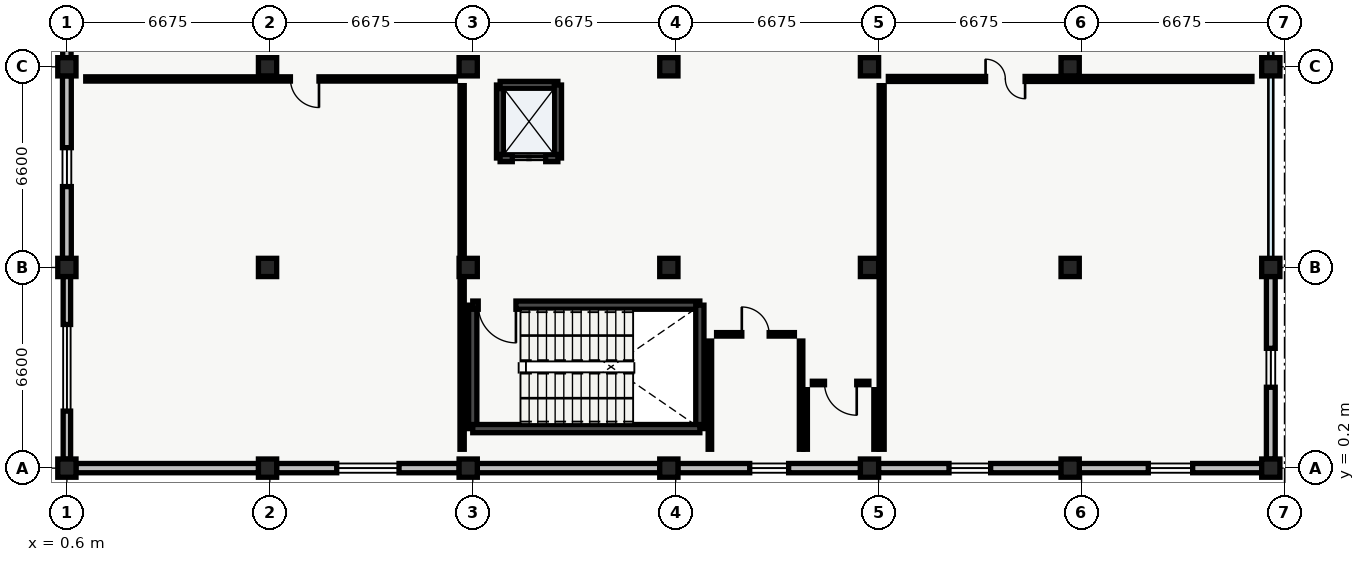
"""IFC4 building model, lengths in metres.
Left out: names, types, materials, properties, quantities, classifications, styles, units other than length and angle.
Written with IfcOpenShell. Run it as: python <this file> out.ifc"""

import sys

from ifc_helpers import new_model, si_unit, direction, frame, frame_2d, origin, origin_2d, place, context, subcontext, project, spatial, rectangle, extrude, element, fill, save


model = new_model("IFC4")
c1 = context("Model", 3, precision=1e-05, world=origin(), true_north=direction((0.0, 1.0)))
c2 = subcontext(c1, "Body", "Model", "MODEL_VIEW")
j1 = project(units=[si_unit("LENGTHUNIT", "METRE"), si_unit("PLANEANGLEUNIT", "RADIAN")], contexts=[c1])
p1 = place(None, origin())
s1 = spatial("IfcSite", under=j1, at=p1, CompositionType="ELEMENT")
p2 = place(p1, origin())
s2 = spatial("IfcBuilding", under=s1, at=p2, CompositionType="ELEMENT")
p3 = place(p2, frame((0.0, 0.0, 9.6)))
s3 = spatial("IfcBuildingStorey", under=s2, at=p3, CompositionType="ELEMENT", Elevation=9.6)
for number, where, z_axis, x_axis in (
    (1, (0.6, 0.2, 0.0), (0.0, 0.0, 1.0), (1.0, 0.0, 0.0)),
    (2, (0.6, 6.8, 0.0), (0.0, 0.0, 1.0), (1.0, 0.0, 0.0)),
    (3, (0.6, 13.4, 0.0), (0.0, 0.0, 1.0), (1.0, 0.0, 0.0)),
    (4, (7.2, 0.2, 0.0), (0.0, 0.0, 1.0), (1.0, 0.0, 0.0)),
    (5, (7.2, 6.8, 0.0), (0.0, 0.0, 1.0), (1.0, 0.0, 0.0)),
    (6, (7.2, 13.4, 0.0), (0.0, 0.0, 1.0), (1.0, 0.0, 0.0)),
    (7, (13.8, 0.2, 0.0), (0.0, 0.0, 1.0), (1.0, 0.0, 0.0)),
    (8, (13.8, 6.8, 0.0), (0.0, 0.0, 1.0), (1.0, 0.0, 0.0)),
    (9, (13.8, 13.4, 0.0), (0.0, 0.0, 1.0), (1.0, 0.0, 0.0)),
    (10, (20.4, 0.2, 0.0), (0.0, 0.0, 1.0), (1.0, 0.0, 0.0)),
    (11, (20.4, 6.8, 0.0), (0.0, 0.0, 1.0), (1.0, 0.0, 0.0)),
    (12, (20.4, 13.4, 0.0), (0.0, 0.0, 1.0), (1.0, 0.0, 0.0)),
    (13, (27.0, 0.2, 0.0), (0.0, 0.0, 1.0), (1.0, 0.0, 0.0)),
    (14, (27.0, 6.8, 0.0), (0.0, 0.0, 1.0), (1.0, 0.0, 0.0)),
    (15, (27.0, 13.4, 0.0), (0.0, 0.0, 1.0), (1.0, 0.0, 0.0)),
    (16, (33.6, 0.2, 0.0), (0.0, 0.0, 1.0), (1.0, 0.0, 0.0)),
    (17, (33.6, 6.8, 0.0), (0.0, 0.0, 1.0), (1.0, 0.0, 0.0)),
    (18, (33.6, 13.4, 0.0), (0.0, 0.0, 1.0), (1.0, 0.0, 0.0)),
    (19, (40.2, 0.2, 0.0), (0.0, 0.0, 1.0), (1.0, 0.0, 0.0)),
    (20, (40.2, 6.8, 0.0), (0.0, 0.0, 1.0), (1.0, 0.0, 0.0)),
    (21, (40.2, 13.4, 0.0), (0.0, 0.0, 1.0), (1.0, 0.0, 0.0)),
):
    element("IfcColumn", number, at=place(p3, frame(where, z_axis=z_axis, x_axis=x_axis)), inside=s3, PredefinedType="COLUMN", context=c2, shape_type="SweptSolid", body=[
        extrude(rectangle(XDim=0.6, YDim=0.6, at=origin_2d()), origin(), (0.0, 0.0, 1.0), 4.28),
    ])
p4 = place(p3, frame((0.6, 0.495, 0.0), z_axis=(0.0, 0.0, 1.0), x_axis=(0.0, 1.0, 0.0)))
e22 = element("IfcWall", 22, at=p4, inside=s3, PredefinedType="STANDARD", context=c2, shape_type="SweptSolid", body=[
    extrude(rectangle(XDim=6.01, YDim=0.245, at=frame_2d((3.005, 0.0))), origin(), (0.0, 0.0, 1.0), 3.815),
])
p5 = place(p4, frame((1.58, 0.0, 0.95)))
e23 = element("IfcOpeningElement", 23, at=p5, cuts=e22, PredefinedType="OPENING", context=c2, shape_type="SweptSolid", body=[
    extrude(rectangle(XDim=2.85, YDim=1.5, at=frame_2d((1.425, 0.75))), frame((0.0, 0.123, 0.0), z_axis=(0.0, -1.0, 0.0), x_axis=(1.0, 0.0, 0.0)), (0.0, 0.0, 1.0), 0.245),
])
p6 = place(p3, frame((0.6, 7.095, 0.0), z_axis=(0.0, 0.0, 1.0), x_axis=(0.0, 1.0, 0.0)))
e24 = element("IfcWall", 24, at=p6, inside=s3, PredefinedType="STANDARD", context=c2, shape_type="SweptSolid", body=[
    extrude(rectangle(XDim=6.01, YDim=0.29, at=frame_2d((3.005, 0.0))), origin(), (0.0, 0.0, 1.0), 3.815),
])
p7 = place(p6, frame((2.365, 0.0, 0.95)))
e25 = element("IfcOpeningElement", 25, at=p7, cuts=e24, PredefinedType="OPENING", context=c2, shape_type="SweptSolid", body=[
    extrude(rectangle(XDim=1.28, YDim=1.42, at=frame_2d((0.64, 0.71))), frame((0.0, 0.145, 0.0), z_axis=(0.0, -1.0, 0.0), x_axis=(1.0, 0.0, 0.0)), (0.0, 0.0, 1.0), 0.29),
])
p8 = place(p3, frame((0.6, 13.695, 0.0), z_axis=(0.0, 0.0, 1.0), x_axis=(0.0, 1.0, 0.0)))
e26 = element("IfcWall", 26, at=p8, inside=s3, PredefinedType="STANDARD", context=c2, shape_type="SweptSolid", body=[
    extrude(rectangle(XDim=6.01, YDim=0.275, at=frame_2d((3.005, 0.0))), origin(), (0.0, 0.0, 1.0), 3.815),
])
p9 = place(p8, frame((1.98, 0.0, 0.95)))
e27 = element("IfcOpeningElement", 27, at=p9, cuts=e26, PredefinedType="OPENING", context=c2, shape_type="SweptSolid", body=[
    extrude(rectangle(XDim=2.05, YDim=1.7, at=frame_2d((1.025, 0.85))), frame((0.0, 0.137, 0.0), z_axis=(0.0, -1.0, 0.0), x_axis=(1.0, 0.0, 0.0)), (0.0, 0.0, 1.0), 0.275),
])
p10 = place(p3, frame((40.2, 6.505, 0.0), z_axis=(0.0, 0.0, 1.0), x_axis=(0.0, -1.0, 0.0)))
e28 = element("IfcWall", 28, at=p10, inside=s3, PredefinedType="STANDARD", context=c2, shape_type="SweptSolid", body=[
    extrude(rectangle(XDim=6.01, YDim=0.29, at=frame_2d((3.005, 0.0))), origin(), (0.0, 0.0, 1.0), 3.815),
])
p11 = place(p10, frame((2.365, 0.0, 0.95)))
e29 = element("IfcOpeningElement", 29, at=p11, cuts=e28, PredefinedType="OPENING", context=c2, shape_type="SweptSolid", body=[
    extrude(rectangle(XDim=1.28, YDim=1.42, at=frame_2d((0.64, 0.71))), frame((0.0, 0.145, 0.0), z_axis=(0.0, -1.0, 0.0), x_axis=(1.0, 0.0, 0.0)), (0.0, 0.0, 1.0), 0.29),
])
p12 = place(p3, frame((39.905, 0.2, 0.0), z_axis=(0.0, 0.0, 1.0), x_axis=(-1.0, 0.0, 0.0)))
e30 = element("IfcWall", 30, at=p12, inside=s3, PredefinedType="STANDARD", context=c2, shape_type="SweptSolid", body=[
    extrude(rectangle(XDim=6.01, YDim=0.305, at=frame_2d((3.005, 0.0))), origin(), (0.0, 0.0, 1.0), 3.815),
])
p13 = place(p12, frame((2.275, 0.0, 0.95)))
e31 = element("IfcOpeningElement", 31, at=p13, cuts=e30, PredefinedType="OPENING", context=c2, shape_type="SweptSolid", body=[
    extrude(rectangle(XDim=1.46, YDim=1.44, at=frame_2d((0.73, 0.72))), frame((0.0, 0.152, 0.0), z_axis=(0.0, -1.0, 0.0), x_axis=(1.0, 0.0, 0.0)), (0.0, 0.0, 1.0), 0.305),
])
p14 = place(p3, frame((33.305, 0.2, 0.0), z_axis=(0.0, 0.0, 1.0), x_axis=(-1.0, 0.0, 0.0)))
e32 = element("IfcWall", 32, at=p14, inside=s3, PredefinedType="STANDARD", context=c2, shape_type="SweptSolid", body=[
    extrude(rectangle(XDim=6.01, YDim=0.305, at=frame_2d((3.005, 0.0))), origin(), (0.0, 0.0, 1.0), 3.815),
])
p15 = place(p14, frame((2.32, 0.0, 0.95)))
e33 = element("IfcOpeningElement", 33, at=p15, cuts=e32, PredefinedType="OPENING", context=c2, shape_type="SweptSolid", body=[
    extrude(rectangle(XDim=1.37, YDim=1.42, at=frame_2d((0.685, 0.71))), frame((0.0, 0.152, 0.0), z_axis=(0.0, -1.0, 0.0), x_axis=(1.0, 0.0, 0.0)), (0.0, 0.0, 1.0), 0.305),
])
p16 = place(p3, frame((26.705, 0.2, 0.0), z_axis=(0.0, 0.0, 1.0), x_axis=(-1.0, 0.0, 0.0)))
e34 = element("IfcWall", 34, at=p16, inside=s3, PredefinedType="STANDARD", context=c2, shape_type="SweptSolid", body=[
    extrude(rectangle(XDim=6.01, YDim=0.305, at=frame_2d((3.005, 0.0))), origin(), (0.0, 0.0, 1.0), 3.815),
])
p17 = place(p16, frame((2.365, 0.0, 0.95)))
e35 = element("IfcOpeningElement", 35, at=p17, cuts=e34, PredefinedType="OPENING", context=c2, shape_type="SweptSolid", body=[
    extrude(rectangle(XDim=1.28, YDim=1.4, at=frame_2d((0.64, 0.7))), frame((0.0, 0.152, 0.0), z_axis=(0.0, -1.0, 0.0), x_axis=(1.0, 0.0, 0.0)), (0.0, 0.0, 1.0), 0.305),
])
p18 = place(p3, frame((20.105, 0.2, 0.0), z_axis=(0.0, 0.0, 1.0), x_axis=(-1.0, 0.0, 0.0)))
e36 = element("IfcWall", 36, at=p18, inside=s3, PredefinedType="STANDARD", context=c2, shape_type="SweptSolid", body=[
    extrude(rectangle(XDim=6.01, YDim=0.305, at=frame_2d((3.005, 0.0))), origin(), (0.0, 0.0, 1.0), 3.815),
])
p19 = place(p3, frame((13.505, 0.2, 0.0), z_axis=(0.0, 0.0, 1.0), x_axis=(-1.0, 0.0, 0.0)))
e37 = element("IfcWall", 37, at=p19, inside=s3, PredefinedType="STANDARD", context=c2, shape_type="SweptSolid", body=[
    extrude(rectangle(XDim=6.01, YDim=0.305, at=frame_2d((3.005, 0.0))), origin(), (0.0, 0.0, 1.0), 3.815),
])
p20 = place(p19, frame((1.98, 0.0, 0.95)))
e38 = element("IfcOpeningElement", 38, at=p20, cuts=e37, PredefinedType="OPENING", context=c2, shape_type="SweptSolid", body=[
    extrude(rectangle(XDim=2.05, YDim=1.7, at=frame_2d((1.025, 0.85))), frame((0.0, 0.152, 0.0), z_axis=(0.0, -1.0, 0.0), x_axis=(1.0, 0.0, 0.0)), (0.0, 0.0, 1.0), 0.305),
])
p21 = place(p3, frame((6.905, 0.2, 0.0), z_axis=(0.0, 0.0, 1.0), x_axis=(-1.0, 0.0, 0.0)))
e39 = element("IfcWall", 39, at=p21, inside=s3, PredefinedType="STANDARD", context=c2, shape_type="SweptSolid", body=[
    extrude(rectangle(XDim=6.01, YDim=0.305, at=frame_2d((3.005, 0.0))), origin(), (0.0, 0.0, 1.0), 3.815),
])
p22 = place(p3, frame((13.95, 1.5, 0.0), z_axis=(0.0, 0.0, 1.0), x_axis=(0.0, 1.0, 0.0)))
e40 = element("IfcWall", 40, at=p22, inside=s3, PredefinedType="SHEAR", context=c2, shape_type="SweptSolid", body=[
    extrude(rectangle(XDim=4.06, YDim=0.27, at=frame_2d((2.03, 0.0))), origin(), (0.0, 0.0, 1.0), 4.28),
])
p23 = place(p3, frame((13.95, 5.56, 0.0), z_axis=(0.0, 0.0, 1.0), x_axis=(1.0, 0.0, 0.0)))
e41 = element("IfcWall", 41, at=p23, inside=s3, PredefinedType="SHEAR", context=c2, shape_type="SweptSolid", body=[
    extrude(rectangle(XDim=7.47, YDim=0.27, at=frame_2d((3.735, 0.0))), origin(), (0.0, 0.0, 1.0), 4.28),
])
p24 = place(p23, frame((0.18, 0.0, 0.0)))
e42 = element("IfcOpeningElement", 42, at=p24, cuts=e41, PredefinedType="OPENING", context=c2, shape_type="SweptSolid", body=[
    extrude(rectangle(XDim=1.24, YDim=2.15, at=frame_2d((0.62, 1.075))), frame((0.0, 0.135, 0.0), z_axis=(0.0, -1.0, 0.0), x_axis=(1.0, 0.0, 0.0)), (0.0, 0.0, 1.0), 0.27),
])
p25 = place(p3, frame((21.42, 5.56, 0.0), z_axis=(0.0, 0.0, 1.0), x_axis=(0.0, -1.0, 0.0)))
e43 = element("IfcWall", 43, at=p25, inside=s3, PredefinedType="SHEAR", context=c2, shape_type="SweptSolid", body=[
    extrude(rectangle(XDim=4.06, YDim=0.27, at=frame_2d((2.03, 0.0))), origin(), (0.0, 0.0, 1.0), 4.28),
])
p26 = place(p3, frame((21.42, 1.5, 0.0), z_axis=(0.0, 0.0, 1.0), x_axis=(-1.0, 0.0, 0.0)))
e44 = element("IfcWall", 44, at=p26, inside=s3, PredefinedType="SHEAR", context=c2, shape_type="SweptSolid", body=[
    extrude(rectangle(XDim=7.47, YDim=0.27, at=frame_2d((3.735, 0.0))), origin(), (0.0, 0.0, 1.0), 4.28),
])
p27 = place(p3, frame((14.85, 10.4, 0.0), z_axis=(0.0, 0.0, 1.0), x_axis=(0.0, 1.0, 0.0)))
e45 = element("IfcWall", 45, at=p27, inside=s3, PredefinedType="SHEAR", context=c2, shape_type="SweptSolid", body=[
    extrude(rectangle(XDim=2.4, YDim=0.24, at=frame_2d((1.2, 0.0))), origin(), (0.0, 0.0, 1.0), 4.28),
])
p28 = place(p3, frame((14.85, 12.8, 0.0), z_axis=(0.0, 0.0, 1.0), x_axis=(1.0, 0.0, 0.0)))
e46 = element("IfcWall", 46, at=p28, inside=s3, PredefinedType="SHEAR", context=c2, shape_type="SweptSolid", body=[
    extrude(rectangle(XDim=1.9, YDim=0.24, at=frame_2d((0.95, 0.0))), origin(), (0.0, 0.0, 1.0), 4.28),
])
p29 = place(p3, frame((16.75, 12.8, 0.0), z_axis=(0.0, 0.0, 1.0), x_axis=(0.0, -1.0, 0.0)))
e47 = element("IfcWall", 47, at=p29, inside=s3, PredefinedType="SHEAR", context=c2, shape_type="SweptSolid", body=[
    extrude(rectangle(XDim=2.4, YDim=0.24, at=frame_2d((1.2, 0.0))), origin(), (0.0, 0.0, 1.0), 4.28),
])
p30 = place(p3, frame((16.75, 10.4, 0.0), z_axis=(0.0, 0.0, 1.0), x_axis=(-1.0, 0.0, 0.0)))
e48 = element("IfcWall", 48, at=p30, inside=s3, PredefinedType="SHEAR", context=c2, shape_type="SweptSolid", body=[
    extrude(rectangle(XDim=1.9, YDim=0.24, at=frame_2d((0.95, 0.0))), origin(), (0.0, 0.0, 1.0), 4.28),
])
p31 = place(p30, frame((0.4, 0.0, 0.0)))
e49 = element("IfcOpeningElement", 49, at=p31, cuts=e48, PredefinedType="OPENING", context=c2, shape_type="SweptSolid", body=[
    extrude(rectangle(XDim=1.1, YDim=2.2, at=frame_2d((0.55, 1.1))), frame((0.0, 0.12, 0.0), z_axis=(0.0, -1.0, 0.0), x_axis=(1.0, 0.0, 0.0)), (0.0, 0.0, 1.0), 0.24),
])
p32 = place(p3, frame((24.75, 0.82, 0.0), z_axis=(0.0, 0.0, 1.0), x_axis=(0.0, 1.0, 0.0)))
e50 = element("IfcWall", 50, at=p32, inside=s3, PredefinedType="PARTITIONING", context=c2, shape_type="SweptSolid", body=[
    extrude(rectangle(XDim=3.56, YDim=0.115, at=frame_2d((1.78, 0.0))), origin(), (0.0, 0.0, 1.0), 3.95),
])
p33 = place(p3, frame((24.53, 4.6, 0.0), z_axis=(0.0, 0.0, 1.0), x_axis=(-1.0, 0.0, 0.0)))
e51 = element("IfcWall", 51, at=p33, inside=s3, PredefinedType="PARTITIONING", context=c2, shape_type="SweptSolid", body=[
    extrude(rectangle(XDim=2.56, YDim=0.115, at=frame_2d((1.28, 0.0))), origin(), (0.0, 0.0, 1.0), 3.95),
])
p34 = place(p33, frame((0.83, 0.0, 0.0)))
e52 = element("IfcOpeningElement", 52, at=p34, cuts=e51, PredefinedType="OPENING", context=c2, shape_type="SweptSolid", body=[
    extrude(rectangle(XDim=0.9, YDim=2.1, at=frame_2d((0.45, 1.05))), frame((0.0, 0.058, 0.0), z_axis=(0.0, -1.0, 0.0), x_axis=(1.0, 0.0, 0.0)), (0.0, 0.0, 1.0), 0.115),
])
p35 = place(p3, frame((21.75, 4.38, 0.0), z_axis=(0.0, 0.0, 1.0), x_axis=(0.0, -1.0, 0.0)))
e53 = element("IfcWall", 53, at=p35, inside=s3, PredefinedType="PARTITIONING", context=c2, shape_type="SweptSolid", body=[
    extrude(rectangle(XDim=3.56, YDim=0.115, at=frame_2d((1.78, 0.0))), origin(), (0.0, 0.0, 1.0), 3.95),
])
p36 = place(p3, frame((27.2, 0.82, 0.0), z_axis=(0.0, 0.0, 1.0), x_axis=(0.0, 1.0, 0.0)))
e54 = element("IfcWall", 54, at=p36, inside=s3, PredefinedType="PARTITIONING", context=c2, shape_type="SweptSolid", body=[
    extrude(rectangle(XDim=1.96, YDim=0.115, at=frame_2d((0.98, 0.0))), origin(), (0.0, 0.0, 1.0), 3.615),
])
p37 = place(p3, frame((26.98, 3.0, 0.0), z_axis=(0.0, 0.0, 1.0), x_axis=(-1.0, 0.0, 0.0)))
e55 = element("IfcWall", 55, at=p37, inside=s3, PredefinedType="PARTITIONING", context=c2, shape_type="SweptSolid", body=[
    extrude(rectangle(XDim=1.86, YDim=0.115, at=frame_2d((0.93, 0.0))), origin(), (0.0, 0.0, 1.0), 3.95),
])
p38 = place(p37, frame((0.4, 0.0, 0.0)))
e56 = element("IfcOpeningElement", 56, at=p38, cuts=e55, PredefinedType="OPENING", context=c2, shape_type="SweptSolid", body=[
    extrude(rectangle(XDim=1.06, YDim=2.12, at=frame_2d((0.53, 1.06))), frame((0.0, 0.058, 0.0), z_axis=(0.0, -1.0, 0.0), x_axis=(1.0, 0.0, 0.0)), (0.0, 0.0, 1.0), 0.115),
])
p39 = place(p3, frame((24.9, 2.78, 0.0), z_axis=(0.0, 0.0, 1.0), x_axis=(0.0, -1.0, 0.0)))
e57 = element("IfcWall", 57, at=p39, inside=s3, PredefinedType="PARTITIONING", context=c2, shape_type="SweptSolid", body=[
    extrude(rectangle(XDim=1.96, YDim=0.115, at=frame_2d((0.98, 0.0))), origin(), (0.0, 0.0, 1.0), 3.95),
])
p40 = place(p3, frame((13.6, 0.82, 0.0), z_axis=(0.0, 0.0, 1.0), x_axis=(0.0, 1.0, 0.0)))
e58 = element("IfcWall", 58, at=p40, inside=s3, PredefinedType="PARTITIONING", context=c2, shape_type="SweptSolid", body=[
    extrude(rectangle(XDim=11.96, YDim=0.14, at=frame_2d((5.98, 0.0))), origin(), (0.0, 0.0, 1.0), 3.615),
])
p41 = place(p3, frame((13.38, 13.0, 0.0), z_axis=(0.0, 0.0, 1.0), x_axis=(-1.0, 0.0, 0.0)))
e59 = element("IfcWall", 59, at=p41, inside=s3, PredefinedType="PARTITIONING", context=c2, shape_type="SweptSolid", body=[
    extrude(rectangle(XDim=12.16, YDim=0.14, at=frame_2d((6.08, 0.0))), origin(), (0.0, 0.0, 1.0), 3.95),
])
p42 = place(p41, frame((4.488, 0.0, 0.0)))
e60 = element("IfcOpeningElement", 60, at=p42, cuts=e59, PredefinedType="OPENING", context=c2, shape_type="SweptSolid", body=[
    extrude(rectangle(XDim=0.94, YDim=2.12, at=frame_2d((0.47, 1.06))), frame((0.0, 0.07, 0.0), z_axis=(0.0, -1.0, 0.0), x_axis=(1.0, 0.0, 0.0)), (0.0, 0.0, 1.0), 0.14),
])
p43 = place(p3, frame((39.58, 13.0, 0.0), z_axis=(0.0, 0.0, 1.0), x_axis=(-1.0, 0.0, 0.0)))
e61 = element("IfcWall", 61, at=p43, inside=s3, PredefinedType="PARTITIONING", context=c2, shape_type="SweptSolid", body=[
    extrude(rectangle(XDim=11.96, YDim=0.165, at=frame_2d((5.98, 0.0))), origin(), (0.0, 0.0, 1.0), 3.95),
])
p44 = place(p43, frame((7.462, 0.0, 0.0)))
e62 = element("IfcOpeningElement", 62, at=p44, cuts=e61, PredefinedType="OPENING", context=c2, shape_type="SweptSolid", body=[
    extrude(rectangle(XDim=1.3, YDim=2.18, at=frame_2d((0.65, 1.09))), frame((0.0, 0.083, 0.0), z_axis=(0.0, -1.0, 0.0), x_axis=(1.0, 0.0, 0.0)), (0.0, 0.0, 1.0), 0.165),
])
p45 = place(p3, frame((27.4, 12.78, 0.0), z_axis=(0.0, 0.0, 1.0), x_axis=(0.0, -1.0, 0.0)))
e63 = element("IfcWall", 63, at=p45, inside=s3, PredefinedType="PARTITIONING", context=c2, shape_type="SweptSolid", body=[
    extrude(rectangle(XDim=11.96, YDim=0.165, at=frame_2d((5.98, 0.0))), origin(), (0.0, 0.0, 1.0), 3.95),
])
p46 = place(p5, origin())
e64 = element("IfcWindow", 64, at=p46, inside=s3, PartitioningType="SINGLE_PANEL", PredefinedType="WINDOW", context=c2, shape_type="SweptSolid", body=[
    extrude(rectangle(XDim=2.85, YDim=1.5, at=frame_2d((1.425, 0.75))), frame((0.0, 0.03, 0.0), z_axis=(0.0, -1.0, 0.0), x_axis=(1.0, 0.0, 0.0)), (0.0, 0.0, 1.0), 0.06),
])
fill(e23, e64)
p47 = place(p7, origin())
e65 = element("IfcWindow", 65, at=p47, inside=s3, PartitioningType="SINGLE_PANEL", PredefinedType="WINDOW", context=c2, shape_type="SweptSolid", body=[
    extrude(rectangle(XDim=1.28, YDim=1.42, at=frame_2d((0.64, 0.71))), frame((0.0, 0.03, 0.0), z_axis=(0.0, -1.0, 0.0), x_axis=(1.0, 0.0, 0.0)), (0.0, 0.0, 1.0), 0.06),
])
fill(e25, e65)
p48 = place(p11, origin())
e66 = element("IfcWindow", 66, at=p48, inside=s3, PartitioningType="SINGLE_PANEL", PredefinedType="WINDOW", context=c2, shape_type="SweptSolid", body=[
    extrude(rectangle(XDim=1.28, YDim=1.42, at=frame_2d((0.64, 0.71))), frame((0.0, 0.03, 0.0), z_axis=(0.0, -1.0, 0.0), x_axis=(1.0, 0.0, 0.0)), (0.0, 0.0, 1.0), 0.06),
])
fill(e29, e66)
p49 = place(p13, origin())
e67 = element("IfcWindow", 67, at=p49, inside=s3, PartitioningType="SINGLE_PANEL", PredefinedType="WINDOW", context=c2, shape_type="SweptSolid", body=[
    extrude(rectangle(XDim=1.46, YDim=1.44, at=frame_2d((0.73, 0.72))), frame((0.0, 0.03, 0.0), z_axis=(0.0, -1.0, 0.0), x_axis=(1.0, 0.0, 0.0)), (0.0, 0.0, 1.0), 0.06),
])
fill(e31, e67)
p50 = place(p15, origin())
e68 = element("IfcWindow", 68, at=p50, inside=s3, PartitioningType="SINGLE_PANEL", PredefinedType="WINDOW", context=c2, shape_type="SweptSolid", body=[
    extrude(rectangle(XDim=1.37, YDim=1.42, at=frame_2d((0.685, 0.71))), frame((0.0, 0.03, 0.0), z_axis=(0.0, -1.0, 0.0), x_axis=(1.0, 0.0, 0.0)), (0.0, 0.0, 1.0), 0.06),
])
fill(e33, e68)
p51 = place(p17, origin())
e69 = element("IfcWindow", 69, at=p51, inside=s3, PartitioningType="SINGLE_PANEL", PredefinedType="WINDOW", context=c2, shape_type="SweptSolid", body=[
    extrude(rectangle(XDim=1.28, YDim=1.4, at=frame_2d((0.64, 0.7))), frame((0.0, 0.03, 0.0), z_axis=(0.0, -1.0, 0.0), x_axis=(1.0, 0.0, 0.0)), (0.0, 0.0, 1.0), 0.06),
])
fill(e35, e69)
p52 = place(p20, origin())
e70 = element("IfcWindow", 70, at=p52, inside=s3, PartitioningType="SINGLE_PANEL", PredefinedType="WINDOW", context=c2, shape_type="SweptSolid", body=[
    extrude(rectangle(XDim=2.05, YDim=1.7, at=frame_2d((1.025, 0.85))), frame((0.0, 0.03, 0.0), z_axis=(0.0, -1.0, 0.0), x_axis=(1.0, 0.0, 0.0)), (0.0, 0.0, 1.0), 0.06),
])
fill(e38, e70)
p53 = place(p24, origin())
e71 = element("IfcDoor", 71, at=p53, inside=s3, OperationType="SINGLE_SWING_RIGHT", PredefinedType="DOOR", context=c2, shape_type="SweptSolid", body=[
    extrude(rectangle(XDim=1.24, YDim=2.15, at=frame_2d((0.62, 1.075))), frame((0.0, 0.025, 0.0), z_axis=(0.0, -1.0, 0.0), x_axis=(1.0, 0.0, 0.0)), (0.0, 0.0, 1.0), 0.05),
])
fill(e42, e71)
p54 = place(p31, origin())
e72 = element("IfcDoor", 72, at=p54, inside=s3, OperationType="SLIDING_TO_LEFT", PredefinedType="DOOR", context=c2, shape_type="SweptSolid", body=[
    extrude(rectangle(XDim=1.1, YDim=2.2, at=frame_2d((0.55, 1.1))), frame((0.0, 0.025, 0.0), z_axis=(0.0, -1.0, 0.0), x_axis=(1.0, 0.0, 0.0)), (0.0, 0.0, 1.0), 0.05),
])
fill(e49, e72)
p55 = place(p34, origin())
e73 = element("IfcDoor", 73, at=p55, inside=s3, OperationType="SINGLE_SWING_RIGHT", PredefinedType="DOOR", context=c2, shape_type="SweptSolid", body=[
    extrude(rectangle(XDim=0.9, YDim=2.1, at=frame_2d((0.45, 1.05))), frame((0.0, 0.025, 0.0), z_axis=(0.0, -1.0, 0.0), x_axis=(1.0, 0.0, 0.0)), (0.0, 0.0, 1.0), 0.05),
])
fill(e52, e73)
p56 = place(p38, origin())
e74 = element("IfcDoor", 74, at=p56, inside=s3, OperationType="SINGLE_SWING_LEFT", PredefinedType="DOOR", context=c2, shape_type="SweptSolid", body=[
    extrude(rectangle(XDim=1.06, YDim=2.12, at=frame_2d((0.53, 1.06))), frame((0.0, 0.025, 0.0), z_axis=(0.0, -1.0, 0.0), x_axis=(1.0, 0.0, 0.0)), (0.0, 0.0, 1.0), 0.05),
])
fill(e56, e74)
p57 = place(p42, origin())
e75 = element("IfcDoor", 75, at=p57, inside=s3, OperationType="SINGLE_SWING_LEFT", PredefinedType="DOOR", context=c2, shape_type="SweptSolid", body=[
    extrude(rectangle(XDim=0.94, YDim=2.12, at=frame_2d((0.47, 1.06))), frame((0.0, 0.025, 0.0), z_axis=(0.0, -1.0, 0.0), x_axis=(1.0, 0.0, 0.0)), (0.0, 0.0, 1.0), 0.05),
])
fill(e60, e75)
p58 = place(p44, origin())
e76 = element("IfcDoor", 76, at=p58, inside=s3, OperationType="DOUBLE_DOOR_SINGLE_SWING", PredefinedType="DOOR", context=c2, shape_type="SweptSolid", body=[
    extrude(rectangle(XDim=1.3, YDim=2.18, at=frame_2d((0.65, 1.09))), frame((0.0, 0.025, 0.0), z_axis=(0.0, -1.0, 0.0), x_axis=(1.0, 0.0, 0.0)), (0.0, 0.0, 1.0), 0.05),
])
fill(e62, e76)
save(model, sys.argv[1])
